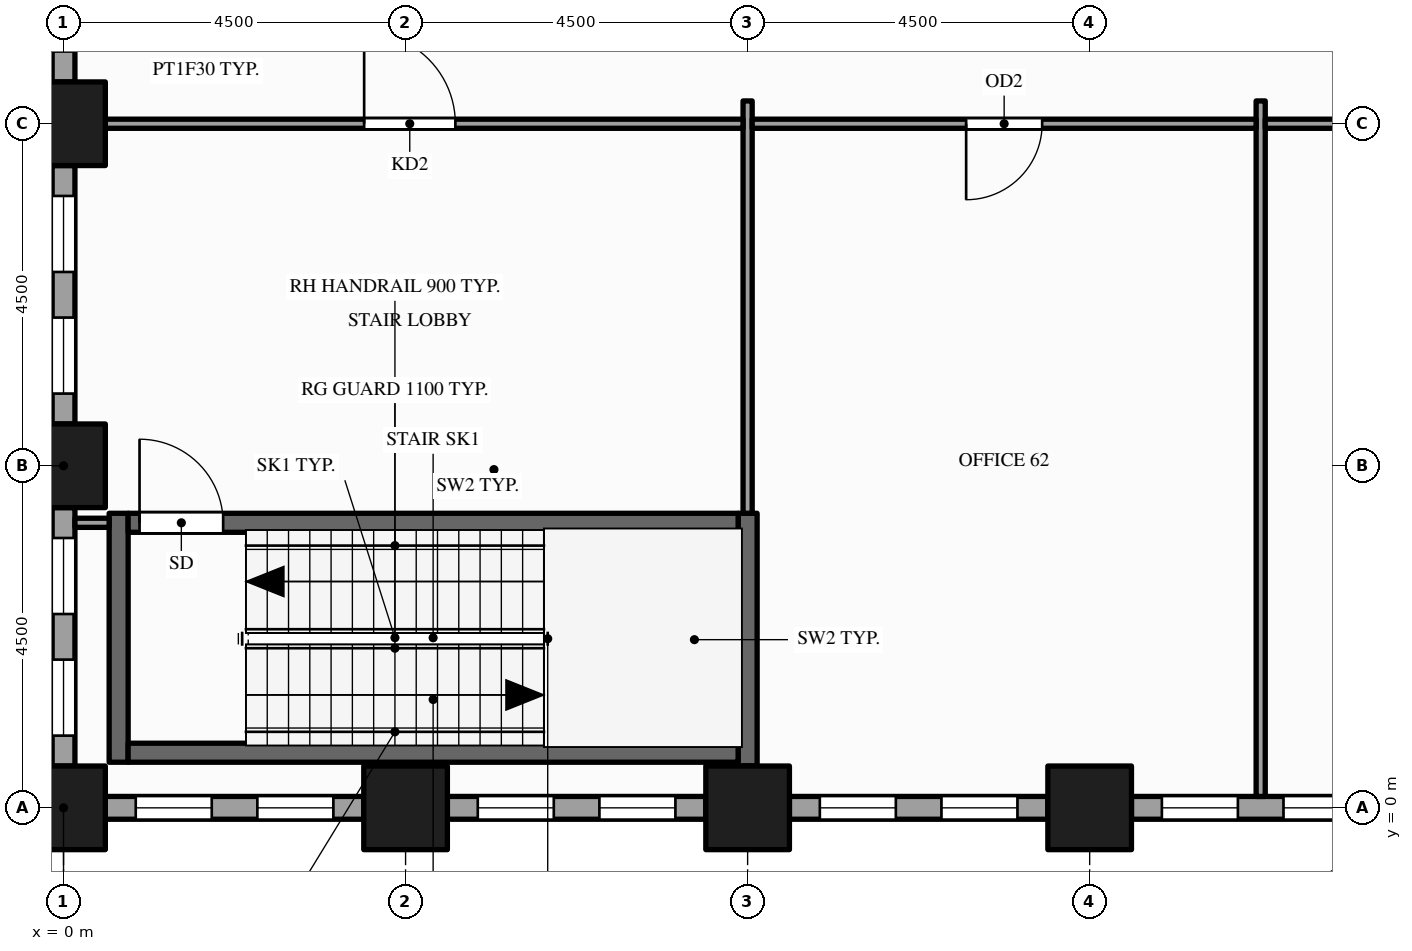
"""IFC4 building model, lengths in metres.
Left out: names, types, materials, properties, quantities, classifications, styles, units other than length and angle.
Written with IfcOpenShell. Run it as: python <this file> out.ifc"""

import sys

from ifc_helpers import new_model, si_unit, direction, frame, frame_2d, origin, origin_2d, place, context, subcontext, project, spatial, rectangle, hollow_rectangle, extrude, element, fill, save


model = new_model("IFC4")
c1 = context("Model", 3, precision=1e-05, world=origin(), true_north=direction((0.0, 1.0)))
c2 = subcontext(c1, "Body", "Model", "MODEL_VIEW")
j1 = project(units=[si_unit("LENGTHUNIT", "METRE"), si_unit("PLANEANGLEUNIT", "RADIAN")], contexts=[c1])
p1 = place(None, origin())
s1 = spatial("IfcSite", under=j1, at=p1, CompositionType="ELEMENT")
p2 = place(p1, origin())
s2 = spatial("IfcBuilding", under=s1, at=p2, CompositionType="ELEMENT")
p3 = place(p2, frame((0.0, 0.0, 19.0)))
s3 = spatial("IfcBuildingStorey", under=s2, at=p3, CompositionType="ELEMENT", Elevation=19.0)
for number, where, z_axis, x_axis in (
    (1, (0.0, 0.0, -0.25), (0.0, 0.0, 1.0), (1.0, 0.0, 0.0)),
    (2, (0.0, 4.5, -0.25), (0.0, 0.0, 1.0), (1.0, 0.0, 0.0)),
    (3, (0.0, 9.0, -0.25), (0.0, 0.0, 1.0), (1.0, 0.0, 0.0)),
    (4, (4.5, 0.0, -0.25), (0.0, 0.0, 1.0), (1.0, 0.0, 0.0)),
    (5, (9.0, 0.0, -0.25), (0.0, 0.0, 1.0), (1.0, 0.0, 0.0)),
    (6, (13.5, 0.0, -0.25), (0.0, 0.0, 1.0), (1.0, 0.0, 0.0)),
):
    element("IfcColumn", number, at=place(p3, frame(where, z_axis=z_axis, x_axis=x_axis)), inside=s3, PredefinedType="COLUMN", context=c2, shape_type="SweptSolid", body=[
        extrude(hollow_rectangle(XDim=1.1, YDim=1.1, WallThickness=0.06, at=origin_2d()), origin(), (0.0, 0.0, 1.0), 5.0),
    ])
p4 = place(p3, frame((0.0, 12.95, 0.0), z_axis=(0.0, 0.0, 1.0), x_axis=(0.0, -1.0, 0.0)))
e7 = element("IfcWall", 7, at=p4, inside=s3, PredefinedType="STANDARD", context=c2, shape_type="SweptSolid", body=[
    extrude(rectangle(XDim=3.4, YDim=0.3, at=frame_2d((1.7, 0.0))), origin(), (0.0, 0.0, 1.0), 4.036),
])
p5 = place(p4, frame((0.4, 0.0, 0.9)))
e8 = element("IfcOpeningElement", 8, at=p5, cuts=e7, PredefinedType="OPENING", context=c2, shape_type="SweptSolid", body=[
    extrude(rectangle(XDim=1.0, YDim=2.75, at=frame_2d((0.5, 1.375))), frame((0.0, 0.16, 0.0), z_axis=(0.0, -1.0, 0.0), x_axis=(1.0, 0.0, 0.0)), (0.0, 0.0, 1.0), 0.32),
])
p6 = place(p4, frame((2.0, 0.0, 0.9)))
e9 = element("IfcOpeningElement", 9, at=p6, cuts=e7, PredefinedType="OPENING", context=c2, shape_type="SweptSolid", body=[
    extrude(rectangle(XDim=1.0, YDim=2.75, at=frame_2d((0.5, 1.375))), frame((0.0, 0.16, 0.0), z_axis=(0.0, -1.0, 0.0), x_axis=(1.0, 0.0, 0.0)), (0.0, 0.0, 1.0), 0.32),
])
p7 = place(p3, frame((0.0, 8.45, 0.0), z_axis=(0.0, 0.0, 1.0), x_axis=(0.0, -1.0, 0.0)))
e10 = element("IfcWall", 10, at=p7, inside=s3, PredefinedType="STANDARD", context=c2, shape_type="SweptSolid", body=[
    extrude(rectangle(XDim=3.4, YDim=0.3, at=frame_2d((1.7, 0.0))), origin(), (0.0, 0.0, 1.0), 4.036),
])
p8 = place(p7, frame((0.4, 0.0, 0.9)))
e11 = element("IfcOpeningElement", 11, at=p8, cuts=e10, PredefinedType="OPENING", context=c2, shape_type="SweptSolid", body=[
    extrude(rectangle(XDim=1.0, YDim=2.75, at=frame_2d((0.5, 1.375))), frame((0.0, 0.16, 0.0), z_axis=(0.0, -1.0, 0.0), x_axis=(1.0, 0.0, 0.0)), (0.0, 0.0, 1.0), 0.32),
])
p9 = place(p7, frame((2.0, 0.0, 0.9)))
e12 = element("IfcOpeningElement", 12, at=p9, cuts=e10, PredefinedType="OPENING", context=c2, shape_type="SweptSolid", body=[
    extrude(rectangle(XDim=1.0, YDim=2.75, at=frame_2d((0.5, 1.375))), frame((0.0, 0.16, 0.0), z_axis=(0.0, -1.0, 0.0), x_axis=(1.0, 0.0, 0.0)), (0.0, 0.0, 1.0), 0.32),
])
p10 = place(p3, frame((0.0, 3.95, 0.0), z_axis=(0.0, 0.0, 1.0), x_axis=(0.0, -1.0, 0.0)))
e13 = element("IfcWall", 13, at=p10, inside=s3, PredefinedType="STANDARD", context=c2, shape_type="SweptSolid", body=[
    extrude(rectangle(XDim=3.4, YDim=0.3, at=frame_2d((1.7, 0.0))), origin(), (0.0, 0.0, 1.0), 4.036),
])
p11 = place(p10, frame((0.4, 0.0, 0.9)))
e14 = element("IfcOpeningElement", 14, at=p11, cuts=e13, PredefinedType="OPENING", context=c2, shape_type="SweptSolid", body=[
    extrude(rectangle(XDim=1.0, YDim=2.75, at=frame_2d((0.5, 1.375))), frame((0.0, 0.16, 0.0), z_axis=(0.0, -1.0, 0.0), x_axis=(1.0, 0.0, 0.0)), (0.0, 0.0, 1.0), 0.32),
])
p12 = place(p10, frame((2.0, 0.0, 0.9)))
e15 = element("IfcOpeningElement", 15, at=p12, cuts=e13, PredefinedType="OPENING", context=c2, shape_type="SweptSolid", body=[
    extrude(rectangle(XDim=1.0, YDim=2.75, at=frame_2d((0.5, 1.375))), frame((0.0, 0.16, 0.0), z_axis=(0.0, -1.0, 0.0), x_axis=(1.0, 0.0, 0.0)), (0.0, 0.0, 1.0), 0.32),
])
p13 = place(p3, frame((0.55, 0.0, 0.0), z_axis=(0.0, 0.0, 1.0), x_axis=(1.0, 0.0, 0.0)))
e16 = element("IfcWall", 16, at=p13, inside=s3, PredefinedType="STANDARD", context=c2, shape_type="SweptSolid", body=[
    extrude(rectangle(XDim=3.4, YDim=0.3, at=frame_2d((1.7, 0.0))), origin(), (0.0, 0.0, 1.0), 4.036),
])
p14 = place(p13, frame((0.4, 0.0, 0.9)))
e17 = element("IfcOpeningElement", 17, at=p14, cuts=e16, PredefinedType="OPENING", context=c2, shape_type="SweptSolid", body=[
    extrude(rectangle(XDim=1.0, YDim=2.75, at=frame_2d((0.5, 1.375))), frame((0.0, 0.16, 0.0), z_axis=(0.0, -1.0, 0.0), x_axis=(1.0, 0.0, 0.0)), (0.0, 0.0, 1.0), 0.32),
])
p15 = place(p13, frame((2.0, 0.0, 0.9)))
e18 = element("IfcOpeningElement", 18, at=p15, cuts=e16, PredefinedType="OPENING", context=c2, shape_type="SweptSolid", body=[
    extrude(rectangle(XDim=1.0, YDim=2.75, at=frame_2d((0.5, 1.375))), frame((0.0, 0.16, 0.0), z_axis=(0.0, -1.0, 0.0), x_axis=(1.0, 0.0, 0.0)), (0.0, 0.0, 1.0), 0.32),
])
p16 = place(p3, frame((5.05, 0.0, 0.0), z_axis=(0.0, 0.0, 1.0), x_axis=(1.0, 0.0, 0.0)))
e19 = element("IfcWall", 19, at=p16, inside=s3, PredefinedType="STANDARD", context=c2, shape_type="SweptSolid", body=[
    extrude(rectangle(XDim=3.4, YDim=0.3, at=frame_2d((1.7, 0.0))), origin(), (0.0, 0.0, 1.0), 4.036),
])
p17 = place(p16, frame((0.4, 0.0, 0.9)))
e20 = element("IfcOpeningElement", 20, at=p17, cuts=e19, PredefinedType="OPENING", context=c2, shape_type="SweptSolid", body=[
    extrude(rectangle(XDim=1.0, YDim=2.75, at=frame_2d((0.5, 1.375))), frame((0.0, 0.16, 0.0), z_axis=(0.0, -1.0, 0.0), x_axis=(1.0, 0.0, 0.0)), (0.0, 0.0, 1.0), 0.32),
])
p18 = place(p16, frame((2.0, 0.0, 0.9)))
e21 = element("IfcOpeningElement", 21, at=p18, cuts=e19, PredefinedType="OPENING", context=c2, shape_type="SweptSolid", body=[
    extrude(rectangle(XDim=1.0, YDim=2.75, at=frame_2d((0.5, 1.375))), frame((0.0, 0.16, 0.0), z_axis=(0.0, -1.0, 0.0), x_axis=(1.0, 0.0, 0.0)), (0.0, 0.0, 1.0), 0.32),
])
p19 = place(p3, frame((9.55, 0.0, 0.0), z_axis=(0.0, 0.0, 1.0), x_axis=(1.0, 0.0, 0.0)))
e22 = element("IfcWall", 22, at=p19, inside=s3, PredefinedType="STANDARD", context=c2, shape_type="SweptSolid", body=[
    extrude(rectangle(XDim=3.4, YDim=0.3, at=frame_2d((1.7, 0.0))), origin(), (0.0, 0.0, 1.0), 4.036),
])
p20 = place(p19, frame((0.4, 0.0, 0.9)))
e23 = element("IfcOpeningElement", 23, at=p20, cuts=e22, PredefinedType="OPENING", context=c2, shape_type="SweptSolid", body=[
    extrude(rectangle(XDim=1.0, YDim=2.75, at=frame_2d((0.5, 1.375))), frame((0.0, 0.16, 0.0), z_axis=(0.0, -1.0, 0.0), x_axis=(1.0, 0.0, 0.0)), (0.0, 0.0, 1.0), 0.32),
])
p21 = place(p19, frame((2.0, 0.0, 0.9)))
e24 = element("IfcOpeningElement", 24, at=p21, cuts=e22, PredefinedType="OPENING", context=c2, shape_type="SweptSolid", body=[
    extrude(rectangle(XDim=1.0, YDim=2.75, at=frame_2d((0.5, 1.375))), frame((0.0, 0.16, 0.0), z_axis=(0.0, -1.0, 0.0), x_axis=(1.0, 0.0, 0.0)), (0.0, 0.0, 1.0), 0.32),
])
p22 = place(p3, frame((14.05, 0.0, 0.0), z_axis=(0.0, 0.0, 1.0), x_axis=(1.0, 0.0, 0.0)))
e25 = element("IfcWall", 25, at=p22, inside=s3, PredefinedType="STANDARD", context=c2, shape_type="SweptSolid", body=[
    extrude(rectangle(XDim=3.4, YDim=0.3, at=frame_2d((1.7, 0.0))), origin(), (0.0, 0.0, 1.0), 4.036),
])
p23 = place(p22, frame((0.4, 0.0, 0.9)))
e26 = element("IfcOpeningElement", 26, at=p23, cuts=e25, PredefinedType="OPENING", context=c2, shape_type="SweptSolid", body=[
    extrude(rectangle(XDim=1.0, YDim=2.75, at=frame_2d((0.5, 1.375))), frame((0.0, 0.16, 0.0), z_axis=(0.0, -1.0, 0.0), x_axis=(1.0, 0.0, 0.0)), (0.0, 0.0, 1.0), 0.32),
])
p24 = place(p22, frame((2.0, 0.0, 0.9)))
e27 = element("IfcOpeningElement", 27, at=p24, cuts=e25, PredefinedType="OPENING", context=c2, shape_type="SweptSolid", body=[
    extrude(rectangle(XDim=1.0, YDim=2.75, at=frame_2d((0.5, 1.375))), frame((0.0, 0.16, 0.0), z_axis=(0.0, -1.0, 0.0), x_axis=(1.0, 0.0, 0.0)), (0.0, 0.0, 1.0), 0.32),
])
p25 = place(p3, frame((0.725, 0.6, 0.0), z_axis=(0.0, 0.0, 1.0), x_axis=(0.0, 1.0, 0.0)))
e28 = element("IfcWall", 28, at=p25, inside=s3, PredefinedType="SHEAR", context=c2, shape_type="SweptSolid", body=[
    extrude(rectangle(XDim=3.275, YDim=0.25, at=frame_2d((1.637, 0.0))), origin(), (0.0, 0.0, 1.0), 4.75),
])
p26 = place(p3, frame((9.0, 0.15, 0.0), z_axis=(0.0, 0.0, 1.0), x_axis=(0.0, 1.0, 0.0)))
e29 = element("IfcWall", 29, at=p26, inside=s3, PredefinedType="PARTITIONING", context=c2, shape_type="SweptSolid", body=[
    extrude(rectangle(XDim=0.4, YDim=0.12, at=frame_2d((0.2, 0.0))), origin(), (0.0, 0.0, 1.0), 4.75),
])
p27 = place(p3, frame((9.0, 0.55, 0.0), z_axis=(0.0, 0.0, 1.0), x_axis=(0.0, 1.0, 0.0)))
e30 = element("IfcWall", 30, at=p27, inside=s3, PredefinedType="SHEAR", context=c2, shape_type="SweptSolid", body=[
    extrude(rectangle(XDim=3.325, YDim=0.25, at=frame_2d((1.663, 0.0))), origin(), (0.0, 0.0, 1.0), 4.75),
])
p28 = place(p3, frame((9.0, 3.875, 0.0), z_axis=(0.0, 0.0, 1.0), x_axis=(0.0, 1.0, 0.0)))
e31 = element("IfcWall", 31, at=p28, inside=s3, PredefinedType="PARTITIONING", context=c2, shape_type="SweptSolid", body=[
    extrude(rectangle(XDim=5.425, YDim=0.12, at=frame_2d((2.712, 0.0))), origin(), (0.0, 0.0, 1.0), 3.759),
])
p29 = place(p3, frame((15.75, 0.15, 0.0), z_axis=(0.0, 0.0, 1.0), x_axis=(0.0, 1.0, 0.0)))
e32 = element("IfcWall", 32, at=p29, inside=s3, PredefinedType="PARTITIONING", context=c2, shape_type="SweptSolid", body=[
    extrude(rectangle(XDim=9.15, YDim=0.12, at=frame_2d((4.575, 0.0))), origin(), (0.0, 0.0, 1.0), 3.759),
])
p30 = place(p3, frame((0.85, 0.725, 0.0), z_axis=(0.0, 0.0, 1.0), x_axis=(1.0, 0.0, 0.0)))
e33 = element("IfcWall", 33, at=p30, inside=s3, PredefinedType="SHEAR", context=c2, shape_type="SweptSolid", body=[
    extrude(rectangle(XDim=8.025, YDim=0.25, at=frame_2d((4.012, 0.0))), origin(), (0.0, 0.0, 1.0), 4.75),
])
p31 = place(p3, frame((0.15, 3.75, 0.0), z_axis=(0.0, 0.0, 1.0), x_axis=(1.0, 0.0, 0.0)))
e34 = element("IfcWall", 34, at=p31, inside=s3, PredefinedType="PARTITIONING", context=c2, shape_type="SweptSolid", body=[
    extrude(rectangle(XDim=0.45, YDim=0.12, at=frame_2d((0.225, 0.0))), origin(), (0.0, 0.0, 1.0), 4.036),
])
p32 = place(p3, frame((0.85, 3.75, 0.0), z_axis=(0.0, 0.0, 1.0), x_axis=(1.0, 0.0, 0.0)))
e35 = element("IfcWall", 35, at=p32, inside=s3, PredefinedType="SHEAR", context=c2, shape_type="SweptSolid", body=[
    extrude(rectangle(XDim=8.025, YDim=0.25, at=frame_2d((4.012, 0.0))), origin(), (0.0, 0.0, 1.0), 4.75),
])
p33 = place(p32, frame((0.15, 0.0, 0.0)))
e36 = element("IfcOpeningElement", 36, at=p33, cuts=e35, PredefinedType="OPENING", context=c2, shape_type="SweptSolid", body=[
    extrude(rectangle(XDim=1.1, YDim=2.1, at=frame_2d((0.55, 1.05))), frame((0.0, 0.135, 0.0), z_axis=(0.0, -1.0, 0.0), x_axis=(1.0, 0.0, 0.0)), (0.0, 0.0, 1.0), 0.27),
])
p34 = place(p3, frame((0.15, 9.0, 0.0), z_axis=(0.0, 0.0, 1.0), x_axis=(1.0, 0.0, 0.0)))
e37 = element("IfcWall", 37, at=p34, inside=s3, PredefinedType="PARTITIONING", context=c2, shape_type="SweptSolid", body=[
    extrude(rectangle(XDim=8.79, YDim=0.12, at=frame_2d((4.395, 0.0))), origin(), (0.0, 0.0, 1.0), 3.759),
])
p35 = place(p34, frame((3.805, 0.0, 0.0)))
e38 = element("IfcOpeningElement", 38, at=p35, cuts=e37, PredefinedType="OPENING", context=c2, shape_type="SweptSolid", body=[
    extrude(rectangle(XDim=1.2, YDim=2.1, at=frame_2d((0.6, 1.05))), frame((0.0, 0.07, 0.0), z_axis=(0.0, -1.0, 0.0), x_axis=(1.0, 0.0, 0.0)), (0.0, 0.0, 1.0), 0.14),
])
p36 = place(p3, frame((9.06, 9.0, 0.0), z_axis=(0.0, 0.0, 1.0), x_axis=(1.0, 0.0, 0.0)))
e39 = element("IfcWall", 39, at=p36, inside=s3, PredefinedType="PARTITIONING", context=c2, shape_type="SweptSolid", body=[
    extrude(rectangle(XDim=6.63, YDim=0.12, at=frame_2d((3.315, 0.0))), origin(), (0.0, 0.0, 1.0), 3.759),
])
p37 = place(p36, frame((2.815, 0.0, 0.0)))
e40 = element("IfcOpeningElement", 40, at=p37, cuts=e39, PredefinedType="OPENING", context=c2, shape_type="SweptSolid", body=[
    extrude(rectangle(XDim=1.0, YDim=2.1, at=frame_2d((0.5, 1.05))), frame((0.0, 0.07, 0.0), z_axis=(0.0, -1.0, 0.0), x_axis=(1.0, 0.0, 0.0)), (0.0, 0.0, 1.0), 0.14),
])
p38 = place(p3, frame((15.81, 9.0, 0.0), z_axis=(0.0, 0.0, 1.0), x_axis=(1.0, 0.0, 0.0)))
e41 = element("IfcWall", 41, at=p38, inside=s3, PredefinedType="PARTITIONING", context=c2, shape_type="SweptSolid", body=[
    extrude(rectangle(XDim=6.63, YDim=0.12, at=frame_2d((3.315, 0.0))), origin(), (0.0, 0.0, 1.0), 3.759),
])
p39 = place(p38, frame((2.815, 0.0, 0.0)))
e42 = element("IfcOpeningElement", 42, at=p39, cuts=e41, PredefinedType="OPENING", context=c2, shape_type="SweptSolid", body=[
    extrude(rectangle(XDim=1.0, YDim=2.1, at=frame_2d((0.5, 1.05))), frame((0.0, 0.07, 0.0), z_axis=(0.0, -1.0, 0.0), x_axis=(1.0, 0.0, 0.0)), (0.0, 0.0, 1.0), 0.14),
])
p40 = place(p8, origin())
e43 = element("IfcWindow", 43, at=p40, inside=s3, PartitioningType="SINGLE_PANEL", PredefinedType="WINDOW", context=c2, shape_type="SweptSolid", body=[
    extrude(rectangle(XDim=1.0, YDim=2.75, at=frame_2d((0.5, 1.375))), frame((0.0, 0.03, 0.0), z_axis=(0.0, -1.0, 0.0), x_axis=(1.0, 0.0, 0.0)), (0.0, 0.0, 1.0), 0.06),
])
fill(e11, e43)
p41 = place(p9, origin())
e44 = element("IfcWindow", 44, at=p41, inside=s3, PartitioningType="SINGLE_PANEL", PredefinedType="WINDOW", context=c2, shape_type="SweptSolid", body=[
    extrude(rectangle(XDim=1.0, YDim=2.75, at=frame_2d((0.5, 1.375))), frame((0.0, 0.03, 0.0), z_axis=(0.0, -1.0, 0.0), x_axis=(1.0, 0.0, 0.0)), (0.0, 0.0, 1.0), 0.06),
])
fill(e12, e44)
p42 = place(p11, origin())
e45 = element("IfcWindow", 45, at=p42, inside=s3, PartitioningType="SINGLE_PANEL", PredefinedType="WINDOW", context=c2, shape_type="SweptSolid", body=[
    extrude(rectangle(XDim=1.0, YDim=2.75, at=frame_2d((0.5, 1.375))), frame((0.0, 0.03, 0.0), z_axis=(0.0, -1.0, 0.0), x_axis=(1.0, 0.0, 0.0)), (0.0, 0.0, 1.0), 0.06),
])
fill(e14, e45)
p43 = place(p12, origin())
e46 = element("IfcWindow", 46, at=p43, inside=s3, PartitioningType="SINGLE_PANEL", PredefinedType="WINDOW", context=c2, shape_type="SweptSolid", body=[
    extrude(rectangle(XDim=1.0, YDim=2.75, at=frame_2d((0.5, 1.375))), frame((0.0, 0.03, 0.0), z_axis=(0.0, -1.0, 0.0), x_axis=(1.0, 0.0, 0.0)), (0.0, 0.0, 1.0), 0.06),
])
fill(e15, e46)
p44 = place(p14, origin())
e47 = element("IfcWindow", 47, at=p44, inside=s3, PartitioningType="SINGLE_PANEL", PredefinedType="WINDOW", context=c2, shape_type="SweptSolid", body=[
    extrude(rectangle(XDim=1.0, YDim=2.75, at=frame_2d((0.5, 1.375))), frame((0.0, 0.03, 0.0), z_axis=(0.0, -1.0, 0.0), x_axis=(1.0, 0.0, 0.0)), (0.0, 0.0, 1.0), 0.06),
])
fill(e17, e47)
p45 = place(p15, origin())
e48 = element("IfcWindow", 48, at=p45, inside=s3, PartitioningType="SINGLE_PANEL", PredefinedType="WINDOW", context=c2, shape_type="SweptSolid", body=[
    extrude(rectangle(XDim=1.0, YDim=2.75, at=frame_2d((0.5, 1.375))), frame((0.0, 0.03, 0.0), z_axis=(0.0, -1.0, 0.0), x_axis=(1.0, 0.0, 0.0)), (0.0, 0.0, 1.0), 0.06),
])
fill(e18, e48)
p46 = place(p17, origin())
e49 = element("IfcWindow", 49, at=p46, inside=s3, PartitioningType="SINGLE_PANEL", PredefinedType="WINDOW", context=c2, shape_type="SweptSolid", body=[
    extrude(rectangle(XDim=1.0, YDim=2.75, at=frame_2d((0.5, 1.375))), frame((0.0, 0.03, 0.0), z_axis=(0.0, -1.0, 0.0), x_axis=(1.0, 0.0, 0.0)), (0.0, 0.0, 1.0), 0.06),
])
fill(e20, e49)
p47 = place(p18, origin())
e50 = element("IfcWindow", 50, at=p47, inside=s3, PartitioningType="SINGLE_PANEL", PredefinedType="WINDOW", context=c2, shape_type="SweptSolid", body=[
    extrude(rectangle(XDim=1.0, YDim=2.75, at=frame_2d((0.5, 1.375))), frame((0.0, 0.03, 0.0), z_axis=(0.0, -1.0, 0.0), x_axis=(1.0, 0.0, 0.0)), (0.0, 0.0, 1.0), 0.06),
])
fill(e21, e50)
p48 = place(p20, origin())
e51 = element("IfcWindow", 51, at=p48, inside=s3, PartitioningType="SINGLE_PANEL", PredefinedType="WINDOW", context=c2, shape_type="SweptSolid", body=[
    extrude(rectangle(XDim=1.0, YDim=2.75, at=frame_2d((0.5, 1.375))), frame((0.0, 0.03, 0.0), z_axis=(0.0, -1.0, 0.0), x_axis=(1.0, 0.0, 0.0)), (0.0, 0.0, 1.0), 0.06),
])
fill(e23, e51)
p49 = place(p21, origin())
e52 = element("IfcWindow", 52, at=p49, inside=s3, PartitioningType="SINGLE_PANEL", PredefinedType="WINDOW", context=c2, shape_type="SweptSolid", body=[
    extrude(rectangle(XDim=1.0, YDim=2.75, at=frame_2d((0.5, 1.375))), frame((0.0, 0.03, 0.0), z_axis=(0.0, -1.0, 0.0), x_axis=(1.0, 0.0, 0.0)), (0.0, 0.0, 1.0), 0.06),
])
fill(e24, e52)
p50 = place(p23, origin())
e53 = element("IfcWindow", 53, at=p50, inside=s3, PartitioningType="SINGLE_PANEL", PredefinedType="WINDOW", context=c2, shape_type="SweptSolid", body=[
    extrude(rectangle(XDim=1.0, YDim=2.75, at=frame_2d((0.5, 1.375))), frame((0.0, 0.03, 0.0), z_axis=(0.0, -1.0, 0.0), x_axis=(1.0, 0.0, 0.0)), (0.0, 0.0, 1.0), 0.06),
])
fill(e26, e53)
p51 = place(p24, origin())
e54 = element("IfcWindow", 54, at=p51, inside=s3, PartitioningType="SINGLE_PANEL", PredefinedType="WINDOW", context=c2, shape_type="SweptSolid", body=[
    extrude(rectangle(XDim=1.0, YDim=2.75, at=frame_2d((0.5, 1.375))), frame((0.0, 0.03, 0.0), z_axis=(0.0, -1.0, 0.0), x_axis=(1.0, 0.0, 0.0)), (0.0, 0.0, 1.0), 0.06),
])
fill(e27, e54)
p52 = place(p33, origin())
e55 = element("IfcDoor", 55, at=p52, inside=s3, OperationType="SINGLE_SWING_LEFT", PredefinedType="DOOR", context=c2, shape_type="SweptSolid", body=[
    extrude(rectangle(XDim=1.1, YDim=2.1, at=frame_2d((0.55, 1.05))), frame((0.0, 0.025, 0.0), z_axis=(0.0, -1.0, 0.0), x_axis=(1.0, 0.0, 0.0)), (0.0, 0.0, 1.0), 0.05),
])
fill(e36, e55)
p53 = place(p35, origin())
e56 = element("IfcDoor", 56, at=p53, inside=s3, OperationType="SINGLE_SWING_LEFT", PredefinedType="DOOR", context=c2, shape_type="SweptSolid", body=[
    extrude(rectangle(XDim=1.2, YDim=2.1, at=frame_2d((0.6, 1.05))), frame((0.0, 0.025, 0.0), z_axis=(0.0, -1.0, 0.0), x_axis=(1.0, 0.0, 0.0)), (0.0, 0.0, 1.0), 0.05),
])
fill(e38, e56)
p54 = place(p37, origin())
e57 = element("IfcDoor", 57, at=p54, inside=s3, OperationType="SINGLE_SWING_LEFT", PredefinedType="DOOR", context=c2, shape_type="SweptSolid", body=[
    extrude(rectangle(XDim=1.0, YDim=2.1, at=frame_2d((0.5, 1.05))), frame((0.0, 0.025, 0.0), z_axis=(0.0, -1.0, 0.0), x_axis=(1.0, 0.0, 0.0)), (0.0, 0.0, 1.0), 0.05),
])
fill(e40, e57)
save(model, sys.argv[1])
